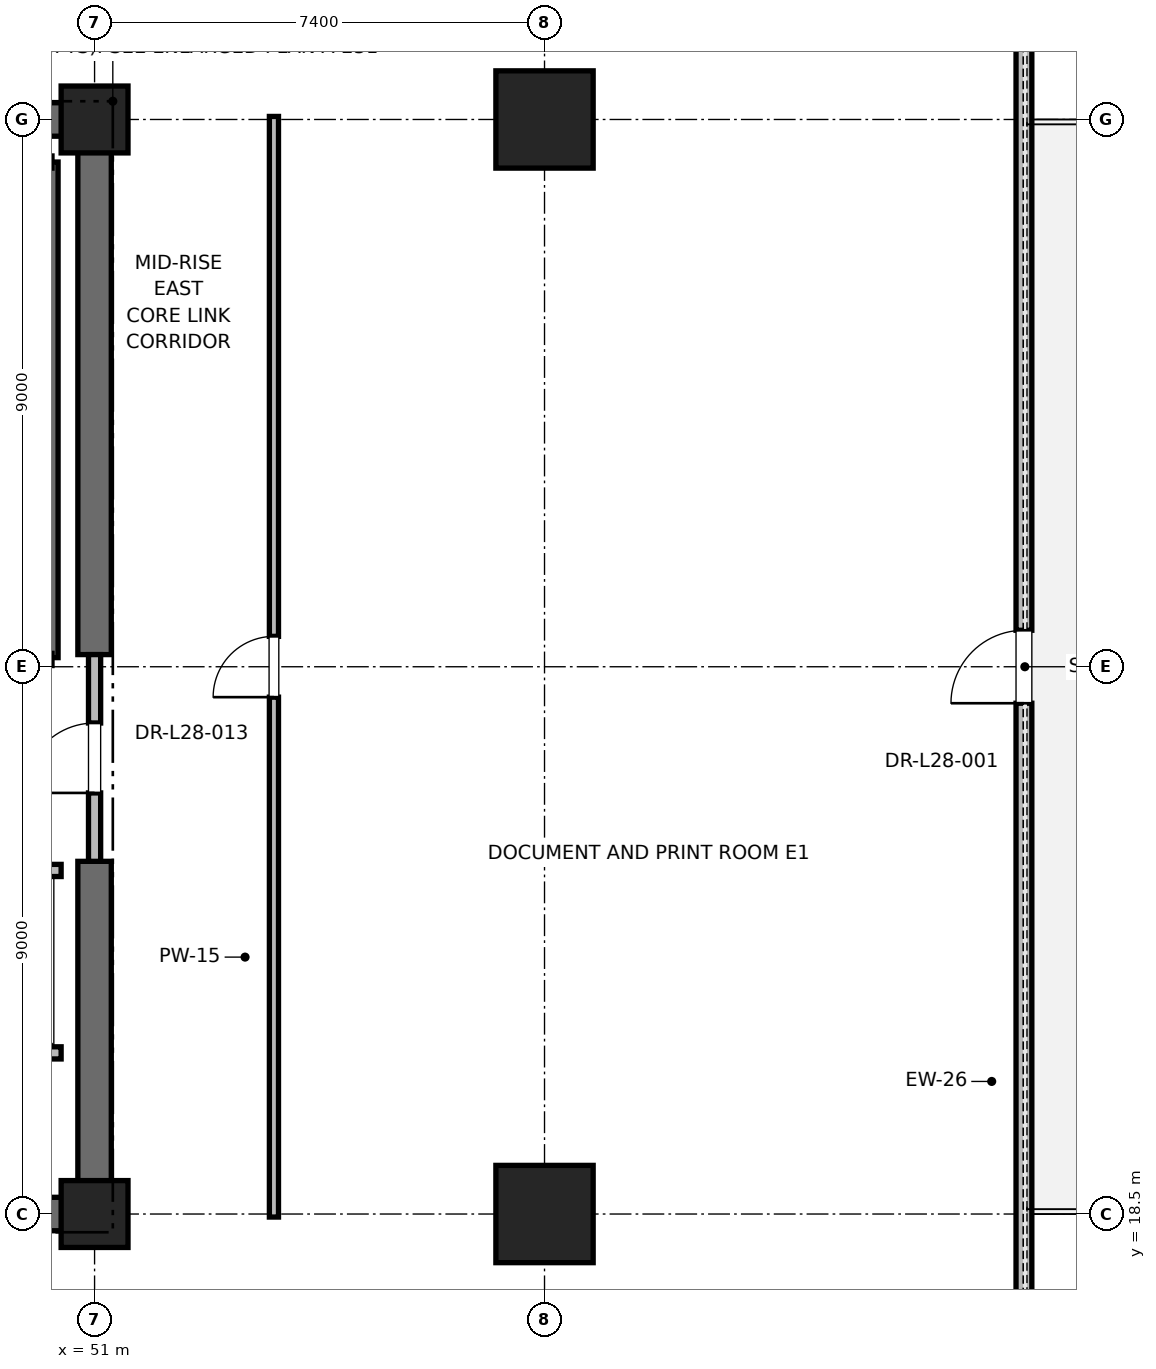
"""IFC4 building model, lengths in metres.
Left out: names, types, materials, properties, quantities, classifications, styles, units other than length and angle.
Written with IfcOpenShell. Run it as: python <this file> out.ifc"""

import sys

from ifc_helpers import new_model, si_unit, direction, frame, frame_2d, origin, origin_2d, place, context, subcontext, project, spatial, rectangle, extrude, element, fill, save


model = new_model("IFC4")
c1 = context("Model", 3, precision=1e-05, world=origin(), true_north=direction((0.0, 1.0)))
c2 = subcontext(c1, "Body", "Model", "MODEL_VIEW")
j1 = project(units=[si_unit("LENGTHUNIT", "METRE"), si_unit("PLANEANGLEUNIT", "RADIAN")], contexts=[c1])
p1 = place(None, origin())
s1 = spatial("IfcSite", under=j1, at=p1, CompositionType="ELEMENT")
p2 = place(p1, origin())
s2 = spatial("IfcBuilding", under=s1, at=p2, CompositionType="ELEMENT")
p3 = place(p2, frame((0.0, 0.0, 123.4)))
s3 = spatial("IfcBuildingStorey", under=s2, at=p3, CompositionType="ELEMENT", Elevation=123.4)
for number, where, z_axis, x_axis in (
    (1, (58.4, 18.5, 0.0), (0.0, 0.0, 1.0), (1.0, 0.0, 0.0)),
    (2, (58.4, 36.5, 0.0), (0.0, 0.0, 1.0), (1.0, 0.0, 0.0)),
):
    element("IfcColumn", number, at=place(p3, frame(where, z_axis=z_axis, x_axis=x_axis)), inside=s3, PredefinedType="COLUMN", context=c2, shape_type="SweptSolid", body=[
        extrude(rectangle(XDim=1.6, YDim=1.6, at=origin_2d()), origin(), (0.0, 0.0, 1.0), 5.0),
    ])
for number, where, z_axis, x_axis in (
    (3, (51.0, 18.5, 0.0), (0.0, 0.0, 1.0), (1.0, 0.0, 0.0)),
    (4, (51.0, 36.5, 0.0), (0.0, 0.0, 1.0), (1.0, 0.0, 0.0)),
):
    element("IfcColumn", number, at=place(p3, frame(where, z_axis=z_axis, x_axis=x_axis)), inside=s3, PredefinedType="PILASTER", context=c2, shape_type="SweptSolid", body=[
        extrude(rectangle(XDim=1.1, YDim=1.1, at=origin_2d()), origin(), (0.0, 0.0, 1.0), 5.0),
    ])
p4 = place(p3, frame((41.8, 18.5, 0.0), z_axis=(0.0, 0.0, 1.0), x_axis=(1.0, 0.0, 0.0)))
e5 = element("IfcWall", 5, at=p4, inside=s3, PredefinedType="SHEAR", context=c2, shape_type="SweptSolid", body=[
    extrude(rectangle(XDim=9.2, YDim=0.55, at=frame_2d((4.6, 0.0))), origin(), (0.0, 0.0, 1.0), 4.775),
])
for number, where, z_axis, x_axis in (
    (6, (45.2, 36.5, 0.0), (0.0, 0.0, 1.0), (1.0, 0.0, 0.0)),
    (7, (51.0, 18.5, 0.0), (0.0, 0.0, 1.0), (0.0, 1.0, 0.0)),
):
    element("IfcWall", number, at=place(p3, frame(where, z_axis=z_axis, x_axis=x_axis)), inside=s3, PredefinedType="SHEAR", context=c2, shape_type="SweptSolid", body=[
        extrude(rectangle(XDim=5.8, YDim=0.55, at=frame_2d((2.9, 0.0))), origin(), (0.0, 0.0, 1.0), 4.775),
    ])
p5 = place(p3, frame((51.0, 27.7, 0.0), z_axis=(0.0, 0.0, 1.0), x_axis=(0.0, 1.0, 0.0)))
e8 = element("IfcWall", 8, at=p5, inside=s3, PredefinedType="SHEAR", context=c2, shape_type="SweptSolid", body=[
    extrude(rectangle(XDim=8.8, YDim=0.55, at=frame_2d((4.4, 0.0))), origin(), (0.0, 0.0, 1.0), 4.775),
])
p6 = place(p3, frame((66.285, 8.261, 0.0), z_axis=(0.0, 0.0, 1.0), x_axis=(0.0, 1.0, 0.0)))
e9 = element("IfcWall", 9, at=p6, inside=s3, PredefinedType="PARAPET", context=c2, shape_type="SweptSolid", body=[
    extrude(rectangle(XDim=38.479, YDim=0.26, at=frame_2d((19.239, 0.0))), origin(), (0.0, 0.0, 1.0), 3.97),
])
p7 = place(p6, frame((4.2, 0.0, 0.85)))
e10 = element("IfcOpeningElement", 10, at=p7, cuts=e9, PredefinedType="OPENING", context=c2, shape_type="SweptSolid", body=[
    extrude(rectangle(XDim=2.0, YDim=2.3, at=frame_2d((1.0, 1.15))), frame((0.0, 0.13, 0.0), z_axis=(0.0, -1.0, 0.0), x_axis=(1.0, 0.0, 0.0)), (0.0, 0.0, 1.0), 0.26),
])
p8 = place(p6, frame((18.639, 0.0, 0.0)))
e11 = element("IfcOpeningElement", 11, at=p8, cuts=e9, PredefinedType="OPENING", context=c2, shape_type="SweptSolid", body=[
    extrude(rectangle(XDim=1.2, YDim=2.2, at=frame_2d((0.6, 1.1))), frame((0.0, 0.13, 0.0), z_axis=(0.0, -1.0, 0.0), x_axis=(1.0, 0.0, 0.0)), (0.0, 0.0, 1.0), 0.26),
])
p9 = place(p6, frame((32.278, 0.0, 0.85)))
e12 = element("IfcOpeningElement", 12, at=p9, cuts=e9, PredefinedType="OPENING", context=c2, shape_type="SweptSolid", body=[
    extrude(rectangle(XDim=2.0, YDim=2.3, at=frame_2d((1.0, 1.15))), frame((0.0, 0.13, 0.0), z_axis=(0.0, -1.0, 0.0), x_axis=(1.0, 0.0, 0.0)), (0.0, 0.0, 1.0), 0.26),
])
p10 = place(p3, frame((50.3, 27.65, 0.0), z_axis=(0.0, 0.0, 1.0), x_axis=(0.0, 1.0, 0.0)))
e13 = element("IfcWall", 13, at=p10, inside=s3, PredefinedType="SOLIDWALL", context=c2, shape_type="SweptSolid", body=[
    extrude(rectangle(XDim=8.15, YDim=0.2, at=frame_2d((4.075, 0.0))), origin(), (0.0, 0.0, 1.0), 4.775),
])
p11 = place(p3, frame((51.0, 24.3, 0.0), z_axis=(0.0, 0.0, 1.0), x_axis=(0.0, 1.0, 0.0)))
e14 = element("IfcWall", 14, at=p11, inside=s3, PredefinedType="PARTITIONING", context=c2, shape_type="SweptSolid", body=[
    extrude(rectangle(XDim=3.4, YDim=0.2, at=frame_2d((1.7, 0.0))), origin(), (0.0, 0.0, 1.0), 3.755),
])
p12 = place(p11, frame((1.125, 0.0, 0.0)))
e15 = element("IfcOpeningElement", 15, at=p12, cuts=e14, PredefinedType="OPENING", context=c2, shape_type="SweptSolid", body=[
    extrude(rectangle(XDim=1.15, YDim=2.2, at=frame_2d((0.575, 1.1))), frame((0.0, 0.1, 0.0), z_axis=(0.0, -1.0, 0.0), x_axis=(1.0, 0.0, 0.0)), (0.0, 0.0, 1.0), 0.2),
])
p13 = place(p3, frame((47.85, 21.15, 0.0), z_axis=(0.0, 0.0, 1.0), x_axis=(1.0, 0.0, 0.0)))
e16 = element("IfcWall", 16, at=p13, inside=s3, PredefinedType="SOLIDWALL", context=c2, shape_type="SweptSolid", body=[
    extrude(rectangle(XDim=2.6, YDim=0.2, at=frame_2d((1.3, 0.0))), origin(), (0.0, 0.0, 1.0), 4.775),
])
p14 = place(p3, frame((50.45, 24.15, 0.0), z_axis=(0.0, 0.0, 1.0), x_axis=(-1.0, 0.0, 0.0)))
e17 = element("IfcWall", 17, at=p14, inside=s3, PredefinedType="SOLIDWALL", context=c2, shape_type="SweptSolid", body=[
    extrude(rectangle(XDim=2.6, YDim=0.2, at=frame_2d((1.3, 0.0))), origin(), (0.0, 0.0, 1.0), 3.755),
])
p15 = place(p14, frame((0.75, 0.0, 0.0)))
e18 = element("IfcOpeningElement", 18, at=p15, cuts=e17, PredefinedType="OPENING", context=c2, shape_type="SweptSolid", body=[
    extrude(rectangle(XDim=1.1, YDim=2.2, at=frame_2d((0.55, 1.1))), frame((0.0, 0.1, 0.0), z_axis=(0.0, -1.0, 0.0), x_axis=(1.0, 0.0, 0.0)), (0.0, 0.0, 1.0), 0.2),
])
p16 = place(p3, frame((53.95, 18.45, 0.0), z_axis=(0.0, 0.0, 1.0), x_axis=(0.0, 1.0, 0.0)))
e19 = element("IfcWall", 19, at=p16, inside=s3, PredefinedType="PARTITIONING", context=c2, shape_type="SweptSolid", body=[
    extrude(rectangle(XDim=18.1, YDim=0.15, at=frame_2d((9.05, 0.0))), origin(), (0.0, 0.0, 1.0), 2.85),
])
p17 = place(p16, frame((8.55, 0.0, 0.0)))
e20 = element("IfcOpeningElement", 20, at=p17, cuts=e19, PredefinedType="OPENING", context=c2, shape_type="SweptSolid", body=[
    extrude(rectangle(XDim=1.0, YDim=2.15, at=frame_2d((0.5, 1.075))), frame((0.0, 0.075, 0.0), z_axis=(0.0, -1.0, 0.0), x_axis=(1.0, 0.0, 0.0)), (0.0, 0.0, 1.0), 0.15),
])
p18 = place(p8, origin())
e21 = element("IfcDoor", 21, at=p18, inside=s3, OperationType="SINGLE_SWING_LEFT", PredefinedType="DOOR", context=c2, shape_type="SweptSolid", body=[
    extrude(rectangle(XDim=1.2, YDim=2.2, at=frame_2d((0.6, 1.1))), frame((0.0, 0.025, 0.0), z_axis=(0.0, -1.0, 0.0), x_axis=(1.0, 0.0, 0.0)), (0.0, 0.0, 1.0), 0.05),
])
fill(e11, e21)
p19 = place(p12, origin())
e22 = element("IfcDoor", 22, at=p19, inside=s3, OperationType="SINGLE_SWING_LEFT", PredefinedType="DOOR", context=c2, shape_type="SweptSolid", body=[
    extrude(rectangle(XDim=1.15, YDim=2.2, at=frame_2d((0.575, 1.1))), frame((0.0, 0.025, 0.0), z_axis=(0.0, -1.0, 0.0), x_axis=(1.0, 0.0, 0.0)), (0.0, 0.0, 1.0), 0.05),
])
fill(e15, e22)
p20 = place(p17, origin())
e23 = element("IfcDoor", 23, at=p20, inside=s3, OperationType="SINGLE_SWING_LEFT", PredefinedType="DOOR", context=c2, shape_type="SweptSolid", body=[
    extrude(rectangle(XDim=1.0, YDim=2.15, at=frame_2d((0.5, 1.075))), frame((0.0, 0.025, 0.0), z_axis=(0.0, -1.0, 0.0), x_axis=(1.0, 0.0, 0.0)), (0.0, 0.0, 1.0), 0.05),
])
fill(e20, e23)
save(model, sys.argv[1])
